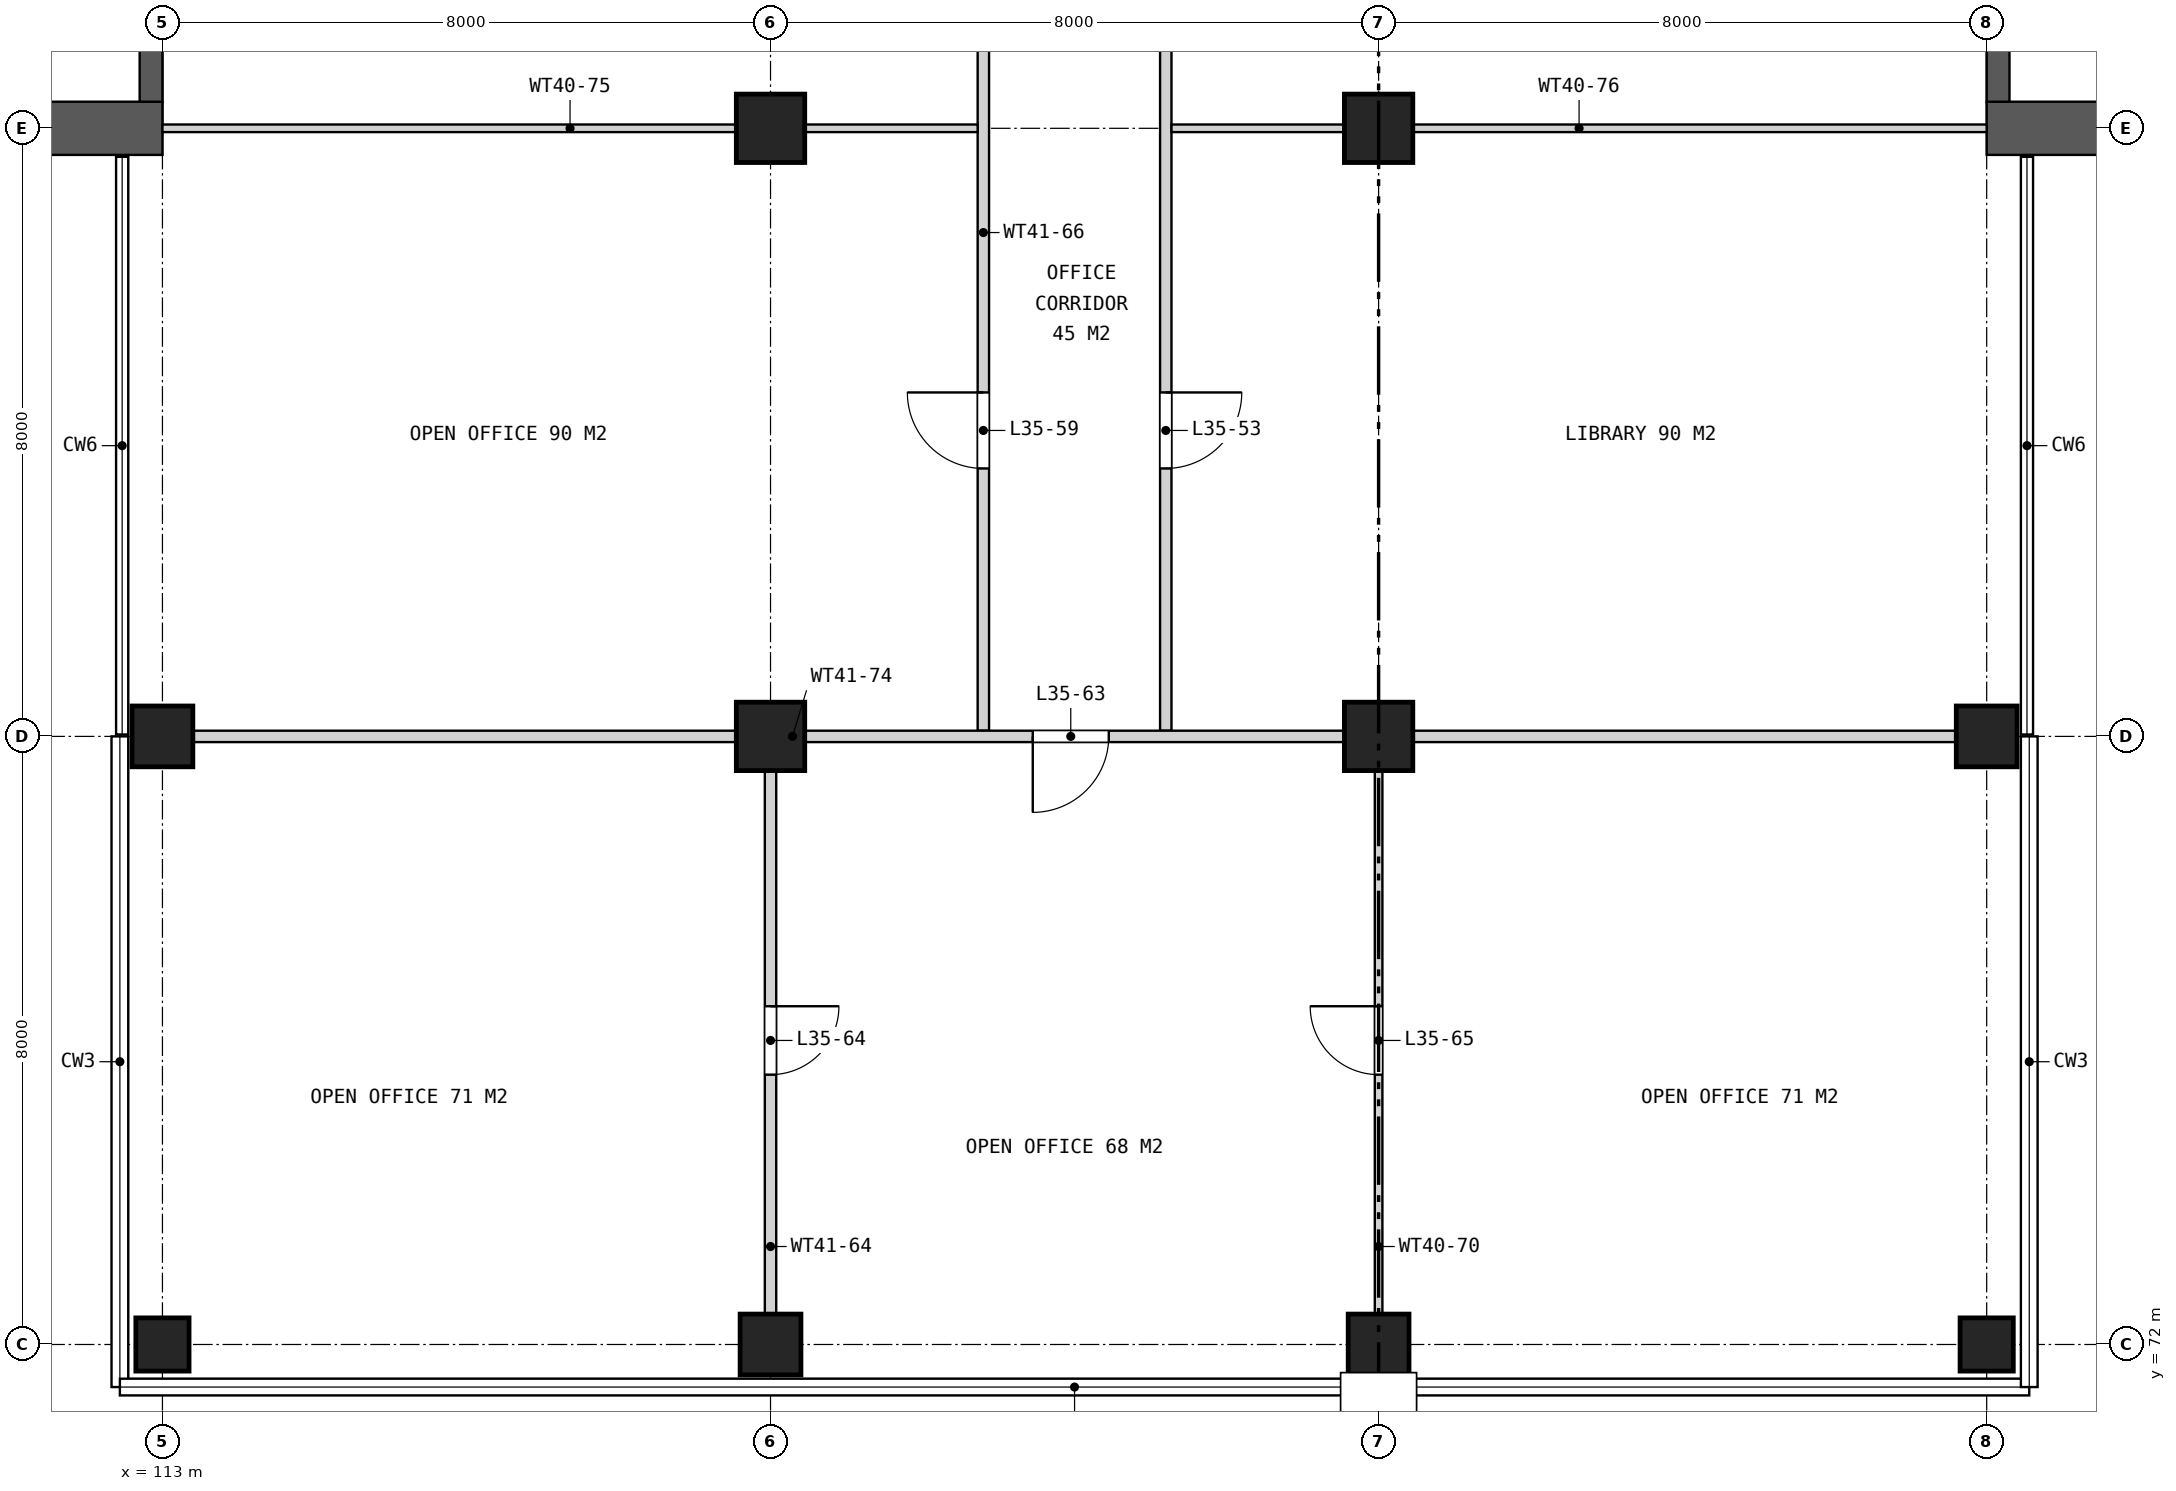
"""IFC4 building model, lengths in metres.
Left out: names, types, materials, properties, quantities, classifications, styles, units other than length and angle.
Written with IfcOpenShell. Run it as: python <this file> out.ifc"""

import sys

from ifc_helpers import new_model, si_unit, direction, frame, frame_2d, origin, origin_2d, place, context, subcontext, project, spatial, rectangle, extrude, element, fill, save


model = new_model("IFC4")
c1 = context("Model", 3, precision=1e-05, world=origin(), true_north=direction((0.0, 1.0)))
c2 = subcontext(c1, "Body", "Model", "MODEL_VIEW")
j1 = project(units=[si_unit("LENGTHUNIT", "METRE"), si_unit("PLANEANGLEUNIT", "RADIAN")], contexts=[c1])
p1 = place(None, origin())
s1 = spatial("IfcSite", under=j1, at=p1, CompositionType="ELEMENT")
p2 = place(p1, origin())
s2 = spatial("IfcBuilding", under=s1, at=p2, CompositionType="ELEMENT")
p3 = place(p2, frame((0.0, 0.0, 167.3)))
s3 = spatial("IfcBuildingStorey", under=s2, at=p3, CompositionType="ELEMENT", Elevation=167.3)
p4 = place(p3, frame((113.0, 72.0, 0.0), z_axis=(0.0, 0.0, 1.0), x_axis=(1.0, 0.0, 0.0)))
e1 = element("IfcColumn", 1, at=p4, inside=s3, PredefinedType="COLUMN", context=c2, shape_type="SweptSolid", body=[
    extrude(rectangle(XDim=0.7, YDim=0.7, at=origin_2d()), origin(), (0.0, 0.0, 1.0), 4.2),
])
for number, where, z_axis, x_axis in (
    (2, (113.0, 80.0, 0.0), (0.0, 0.0, 1.0), (1.0, 0.0, 0.0)),
    (3, (121.0, 72.0, 0.0), (0.0, 0.0, 1.0), (1.0, 0.0, 0.0)),
):
    element("IfcColumn", number, at=place(p3, frame(where, z_axis=z_axis, x_axis=x_axis)), inside=s3, PredefinedType="COLUMN", context=c2, shape_type="SweptSolid", body=[
        extrude(rectangle(XDim=0.8, YDim=0.8, at=origin_2d()), origin(), (0.0, 0.0, 1.0), 4.2),
    ])
for number, where, z_axis, x_axis in (
    (4, (121.0, 80.0, 0.0), (0.0, 0.0, 1.0), (1.0, 0.0, 0.0)),
    (5, (121.0, 88.0, 0.0), (0.0, 0.0, 1.0), (1.0, 0.0, 0.0)),
):
    element("IfcColumn", number, at=place(p3, frame(where, z_axis=z_axis, x_axis=x_axis)), inside=s3, PredefinedType="COLUMN", context=c2, shape_type="SweptSolid", body=[
        extrude(rectangle(XDim=0.9, YDim=0.9, at=origin_2d()), origin(), (0.0, 0.0, 1.0), 4.2),
    ])
p5 = place(p3, frame((129.0, 72.0, 0.0), z_axis=(0.0, 0.0, 1.0), x_axis=(1.0, 0.0, 0.0)))
e6 = element("IfcColumn", 6, at=p5, inside=s3, PredefinedType="COLUMN", context=c2, shape_type="SweptSolid", body=[
    extrude(rectangle(XDim=0.8, YDim=0.8, at=origin_2d()), origin(), (0.0, 0.0, 1.0), 4.2),
])
for number, where, z_axis, x_axis in (
    (7, (129.0, 80.0, 0.0), (0.0, 0.0, 1.0), (1.0, 0.0, 0.0)),
    (8, (129.0, 88.0, 0.0), (0.0, 0.0, 1.0), (1.0, 0.0, 0.0)),
):
    element("IfcColumn", number, at=place(p3, frame(where, z_axis=z_axis, x_axis=x_axis)), inside=s3, PredefinedType="COLUMN", context=c2, shape_type="SweptSolid", body=[
        extrude(rectangle(XDim=0.9, YDim=0.9, at=origin_2d()), origin(), (0.0, 0.0, 1.0), 4.2),
    ])
p6 = place(p3, frame((137.0, 72.0, 0.0), z_axis=(0.0, 0.0, 1.0), x_axis=(1.0, 0.0, 0.0)))
e9 = element("IfcColumn", 9, at=p6, inside=s3, PredefinedType="COLUMN", context=c2, shape_type="SweptSolid", body=[
    extrude(rectangle(XDim=0.7, YDim=0.7, at=origin_2d()), origin(), (0.0, 0.0, 1.0), 4.2),
])
p7 = place(p3, frame((137.0, 80.0, 0.0), z_axis=(0.0, 0.0, 1.0), x_axis=(1.0, 0.0, 0.0)))
e10 = element("IfcColumn", 10, at=p7, inside=s3, PredefinedType="COLUMN", context=c2, shape_type="SweptSolid", body=[
    extrude(rectangle(XDim=0.8, YDim=0.8, at=origin_2d()), origin(), (0.0, 0.0, 1.0), 4.2),
])
p8 = place(p3, frame((137.0, 88.0, 0.0), z_axis=(0.0, 0.0, 1.0), x_axis=(1.0, 0.0, 0.0)))
e11 = element("IfcWall", 11, at=p8, inside=s3, PredefinedType="SHEAR", context=c2, shape_type="SweptSolid", body=[
    extrude(rectangle(XDim=7.1, YDim=0.7, at=frame_2d((3.55, 0.0))), origin(), (0.0, 0.0, 1.0), 4.2),
])
p9 = place(p3, frame((137.15, 88.35, 0.0), z_axis=(0.0, 0.0, 1.0), x_axis=(0.0, 1.0, 0.0)))
e12 = element("IfcWall", 12, at=p9, inside=s3, PredefinedType="SHEAR", context=c2, shape_type="SweptSolid", body=[
    extrude(rectangle(XDim=5.95, YDim=0.3, at=frame_2d((2.975, 0.0))), origin(), (0.0, 0.0, 1.0), 4.2),
])
p10 = place(p3, frame((113.0, 88.0, 0.0), z_axis=(0.0, 0.0, 1.0), x_axis=(-1.0, 0.0, 0.0)))
e13 = element("IfcWall", 13, at=p10, inside=s3, PredefinedType="SHEAR", context=c2, shape_type="SweptSolid", body=[
    extrude(rectangle(XDim=7.1, YDim=0.7, at=frame_2d((3.55, 0.0))), origin(), (0.0, 0.0, 1.0), 4.2),
])
p11 = place(p3, frame((112.85, 94.3, 0.0), z_axis=(0.0, 0.0, 1.0), x_axis=(0.0, -1.0, 0.0)))
e14 = element("IfcWall", 14, at=p11, inside=s3, PredefinedType="SHEAR", context=c2, shape_type="SweptSolid", body=[
    extrude(rectangle(XDim=5.95, YDim=0.3, at=frame_2d((2.975, 0.0))), origin(), (0.0, 0.0, 1.0), 4.2),
])
p12 = place(p3, frame((121.0, 71.63, 0.0), z_axis=(0.0, 0.0, 1.0), x_axis=(0.0, 1.0, 0.0)))
e15 = element("IfcWall", 15, at=p12, inside=s3, PredefinedType="PARTITIONING", context=c2, shape_type="SweptSolid", body=[
    extrude(rectangle(XDim=8.295, YDim=0.15, at=frame_2d((4.147, 0.0))), origin(), (0.0, 0.0, 1.0), 3.26),
])
p13 = place(p12, frame((3.92, 0.0, 0.0)))
e16 = element("IfcOpeningElement", 16, at=p13, cuts=e15, PredefinedType="OPENING", context=c2, shape_type="SweptSolid", body=[
    extrude(rectangle(XDim=0.9, YDim=2.1, at=frame_2d((0.45, 1.05))), frame((0.0, 0.085, 0.0), z_axis=(0.0, -1.0, 0.0), x_axis=(1.0, 0.0, 0.0)), (0.0, 0.0, 1.0), 0.17),
])
p14 = place(p3, frame((123.8, 80.075, 0.0), z_axis=(0.0, 0.0, 1.0), x_axis=(0.0, 1.0, 0.0)))
e17 = element("IfcWall", 17, at=p14, inside=s3, PredefinedType="PARTITIONING", context=c2, shape_type="SweptSolid", body=[
    extrude(rectangle(XDim=18.725, YDim=0.15, at=frame_2d((9.363, 0.0))), origin(), (0.0, 0.0, 1.0), 3.26),
])
p15 = place(p14, frame((15.875, 0.0, 0.0)))
e18 = element("IfcOpeningElement", 18, at=p15, cuts=e17, PredefinedType="OPENING", context=c2, shape_type="SweptSolid", body=[
    extrude(rectangle(XDim=1.0, YDim=2.1, at=frame_2d((0.5, 1.05))), frame((0.0, 0.085, 0.0), z_axis=(0.0, -1.0, 0.0), x_axis=(1.0, 0.0, 0.0)), (0.0, 0.0, 1.0), 0.17),
])
p16 = place(p14, frame((10.375, 0.0, 0.0)))
e19 = element("IfcOpeningElement", 19, at=p16, cuts=e17, PredefinedType="OPENING", context=c2, shape_type="SweptSolid", body=[
    extrude(rectangle(XDim=1.0, YDim=2.1, at=frame_2d((0.5, 1.05))), frame((0.0, 0.085, 0.0), z_axis=(0.0, -1.0, 0.0), x_axis=(1.0, 0.0, 0.0)), (0.0, 0.0, 1.0), 0.17),
])
p17 = place(p14, frame((3.45, 0.0, 0.0)))
e20 = element("IfcOpeningElement", 20, at=p17, cuts=e17, PredefinedType="OPENING", context=c2, shape_type="SweptSolid", body=[
    extrude(rectangle(XDim=1.0, YDim=2.1, at=frame_2d((0.5, 1.05))), frame((0.0, 0.085, 0.0), z_axis=(0.0, -1.0, 0.0), x_axis=(1.0, 0.0, 0.0)), (0.0, 0.0, 1.0), 0.17),
])
p18 = place(p3, frame((126.2, 80.075, 0.0), z_axis=(0.0, 0.0, 1.0), x_axis=(0.0, 1.0, 0.0)))
e21 = element("IfcWall", 21, at=p18, inside=s3, PredefinedType="PARTITIONING", context=c2, shape_type="SweptSolid", body=[
    extrude(rectangle(XDim=18.725, YDim=0.15, at=frame_2d((9.363, 0.0))), origin(), (0.0, 0.0, 1.0), 3.26),
])
p19 = place(p18, frame((15.875, 0.0, 0.0)))
e22 = element("IfcOpeningElement", 22, at=p19, cuts=e21, PredefinedType="OPENING", context=c2, shape_type="SweptSolid", body=[
    extrude(rectangle(XDim=1.0, YDim=2.1, at=frame_2d((0.5, 1.05))), frame((0.0, 0.085, 0.0), z_axis=(0.0, -1.0, 0.0), x_axis=(1.0, 0.0, 0.0)), (0.0, 0.0, 1.0), 0.17),
])
p20 = place(p18, frame((3.45, 0.0, 0.0)))
e23 = element("IfcOpeningElement", 23, at=p20, cuts=e21, PredefinedType="OPENING", context=c2, shape_type="SweptSolid", body=[
    extrude(rectangle(XDim=1.0, YDim=2.1, at=frame_2d((0.5, 1.05))), frame((0.0, 0.085, 0.0), z_axis=(0.0, -1.0, 0.0), x_axis=(1.0, 0.0, 0.0)), (0.0, 0.0, 1.0), 0.17),
])
p21 = place(p3, frame((129.0, 71.63, 0.0), z_axis=(0.0, 0.0, 1.0), x_axis=(0.0, 1.0, 0.0)))
e24 = element("IfcWall", 24, at=p21, inside=s3, PredefinedType="PARTITIONING", context=c2, shape_type="SweptSolid", body=[
    extrude(rectangle(XDim=8.295, YDim=0.1, at=frame_2d((4.147, 0.0))), origin(), (0.0, 0.0, 1.0), 3.26),
])
p22 = place(p21, frame((3.92, 0.0, 0.0)))
e25 = element("IfcOpeningElement", 25, at=p22, cuts=e24, PredefinedType="OPENING", context=c2, shape_type="SweptSolid", body=[
    extrude(rectangle(XDim=0.9, YDim=2.1, at=frame_2d((0.45, 1.05))), frame((0.0, 0.06, 0.0), z_axis=(0.0, -1.0, 0.0), x_axis=(1.0, 0.0, 0.0)), (0.0, 0.0, 1.0), 0.12),
])
p23 = place(p3, frame((112.63, 80.0, 0.0), z_axis=(0.0, 0.0, 1.0), x_axis=(1.0, 0.0, 0.0)))
e26 = element("IfcWall", 26, at=p23, inside=s3, PredefinedType="PARTITIONING", context=c2, shape_type="SweptSolid", body=[
    extrude(rectangle(XDim=24.74, YDim=0.15, at=frame_2d((12.37, 0.0))), origin(), (0.0, 0.0, 1.0), 3.26),
])
p24 = place(p23, frame((11.82, 0.0, 0.0)))
e27 = element("IfcOpeningElement", 27, at=p24, cuts=e26, PredefinedType="OPENING", context=c2, shape_type="SweptSolid", body=[
    extrude(rectangle(XDim=1.0, YDim=2.1, at=frame_2d((0.5, 1.05))), frame((0.0, 0.085, 0.0), z_axis=(0.0, -1.0, 0.0), x_axis=(1.0, 0.0, 0.0)), (0.0, 0.0, 1.0), 0.17),
])
for number, where, z_axis, x_axis in (
    (28, (113.0, 88.0, 0.0), (0.0, 0.0, 1.0), (1.0, 0.0, 0.0)),
    (29, (126.275, 88.0, 0.0), (0.0, 0.0, 1.0), (1.0, 0.0, 0.0)),
):
    element("IfcWall", number, at=place(p3, frame(where, z_axis=z_axis, x_axis=x_axis)), inside=s3, PredefinedType="PARTITIONING", context=c2, shape_type="SweptSolid", body=[
        extrude(rectangle(XDim=10.725, YDim=0.1, at=frame_2d((5.363, 0.0))), origin(), (0.0, 0.0, 1.0), 3.26),
    ])
p25 = place(p20, frame((1.0, 0.0, 0.0), z_axis=(0.0, 0.0, 1.0), x_axis=(-1.0, 0.0, 0.0)))
e30 = element("IfcDoor", 30, at=p25, inside=s3, OperationType="SINGLE_SWING_LEFT", PredefinedType="DOOR", context=c2, shape_type="SweptSolid", body=[
    extrude(rectangle(XDim=1.0, YDim=2.1, at=frame_2d((0.5, 1.05))), frame((0.0, 0.025, 0.0), z_axis=(0.0, -1.0, 0.0), x_axis=(1.0, 0.0, 0.0)), (0.0, 0.0, 1.0), 0.05),
])
fill(e23, e30)
p26 = place(p17, origin())
e31 = element("IfcDoor", 31, at=p26, inside=s3, OperationType="SINGLE_SWING_RIGHT", PredefinedType="DOOR", context=c2, shape_type="SweptSolid", body=[
    extrude(rectangle(XDim=1.0, YDim=2.1, at=frame_2d((0.5, 1.05))), frame((0.0, 0.025, 0.0), z_axis=(0.0, -1.0, 0.0), x_axis=(1.0, 0.0, 0.0)), (0.0, 0.0, 1.0), 0.05),
])
fill(e20, e31)
p27 = place(p24, frame((1.0, 0.0, 0.0), z_axis=(0.0, 0.0, 1.0), x_axis=(-1.0, 0.0, 0.0)))
e32 = element("IfcDoor", 32, at=p27, inside=s3, OperationType="SINGLE_SWING_RIGHT", PredefinedType="DOOR", context=c2, shape_type="SweptSolid", body=[
    extrude(rectangle(XDim=1.0, YDim=2.1, at=frame_2d((0.5, 1.05))), frame((0.0, 0.025, 0.0), z_axis=(0.0, -1.0, 0.0), x_axis=(1.0, 0.0, 0.0)), (0.0, 0.0, 1.0), 0.05),
])
fill(e27, e32)
p28 = place(p13, frame((0.9, 0.0, 0.0), z_axis=(0.0, 0.0, 1.0), x_axis=(-1.0, 0.0, 0.0)))
e33 = element("IfcDoor", 33, at=p28, inside=s3, OperationType="SINGLE_SWING_LEFT", PredefinedType="DOOR", context=c2, shape_type="SweptSolid", body=[
    extrude(rectangle(XDim=0.9, YDim=2.1, at=frame_2d((0.45, 1.05))), frame((0.0, 0.025, 0.0), z_axis=(0.0, -1.0, 0.0), x_axis=(1.0, 0.0, 0.0)), (0.0, 0.0, 1.0), 0.05),
])
fill(e16, e33)
p29 = place(p22, origin())
e34 = element("IfcDoor", 34, at=p29, inside=s3, OperationType="SINGLE_SWING_RIGHT", PredefinedType="DOOR", context=c2, shape_type="SweptSolid", body=[
    extrude(rectangle(XDim=0.9, YDim=2.1, at=frame_2d((0.45, 1.05))), frame((0.0, 0.025, 0.0), z_axis=(0.0, -1.0, 0.0), x_axis=(1.0, 0.0, 0.0)), (0.0, 0.0, 1.0), 0.05),
])
fill(e25, e34)
save(model, sys.argv[1])
